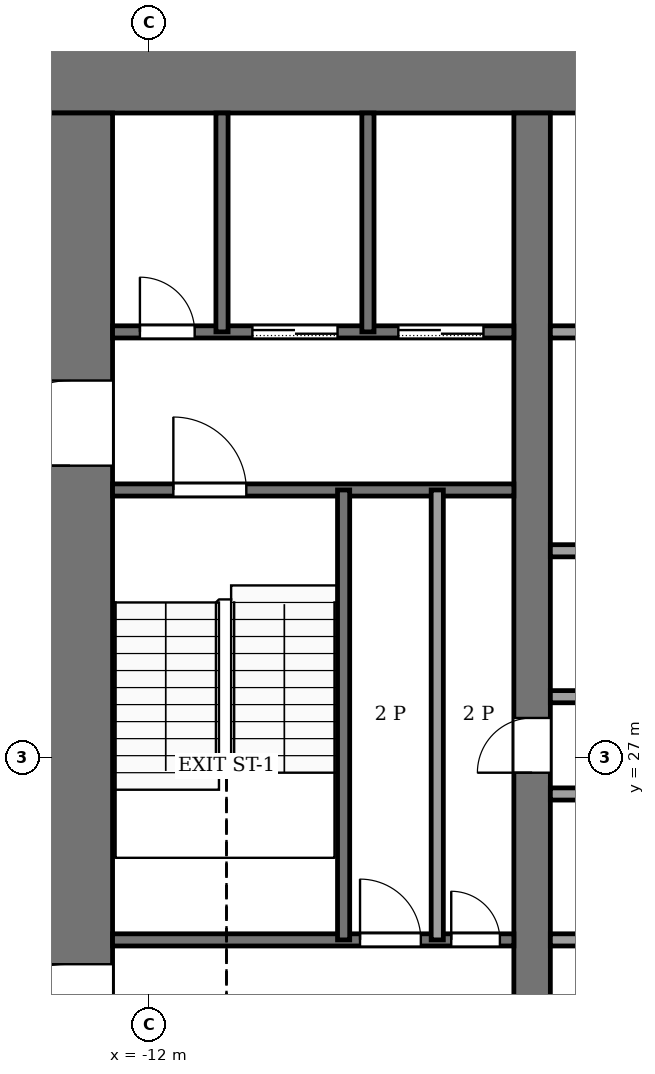
"""IFC4 building model, lengths in metres.
Left out: names, types, materials, properties, quantities, classifications, styles, units other than length and angle.
Written with IfcOpenShell. Run it as: python <this file> out.ifc"""

import sys

from ifc_helpers import new_model, si_unit, direction, frame, frame_2d, origin, place, context, subcontext, project, spatial, rectangle, extrude, element, fill, save


model = new_model("IFC4")
c1 = context("Model", 3, precision=1e-05, world=origin(), true_north=direction((0.0, 1.0)))
c2 = subcontext(c1, "Body", "Model", "MODEL_VIEW")
j1 = project(units=[si_unit("LENGTHUNIT", "METRE"), si_unit("PLANEANGLEUNIT", "RADIAN")], contexts=[c1])
p1 = place(None, origin())
s1 = spatial("IfcSite", under=j1, at=p1, CompositionType="ELEMENT")
p2 = place(p1, origin())
s2 = spatial("IfcBuilding", under=s1, at=p2, CompositionType="ELEMENT")
p3 = place(p2, frame((0.0, 0.0, 34.0)))
s3 = spatial("IfcBuildingStorey", under=s2, at=p3, CompositionType="ELEMENT", Elevation=34.0)
p4 = place(p3, frame((-14.0, 38.3, -0.13), z_axis=(0.0, 0.0, 1.0), x_axis=(1.0, 0.0, 0.0)))
e1 = element("IfcWall", 1, at=p4, inside=s3, PredefinedType="SHEAR", context=c2, shape_type="SweptSolid", body=[
    extrude(rectangle(XDim=28.0, YDim=1.4, at=frame_2d((14.0, 0.0))), origin(), (0.0, 0.0, 1.0), 4.0),
])
p5 = place(p3, frame((-13.3, 18.4, -0.13), z_axis=(0.0, 0.0, 1.0), x_axis=(0.0, 1.0, 0.0)))
e2 = element("IfcWall", 2, at=p5, inside=s3, PredefinedType="SHEAR", context=c2, shape_type="SweptSolid", body=[
    extrude(rectangle(XDim=19.2, YDim=1.4, at=frame_2d((9.6, 0.0))), origin(), (0.0, 0.0, 1.0), 4.0),
])
p6 = place(p5, frame((2.8, 0.0, 0.13)))
e3 = element("IfcOpeningElement", 3, at=p6, cuts=e2, PredefinedType="OPENING", context=c2, shape_type="SweptSolid", body=[
    extrude(rectangle(XDim=2.4, YDim=2.4, at=frame_2d((1.2, 1.2))), frame((0.0, 0.71, 0.0), z_axis=(0.0, -1.0, 0.0), x_axis=(1.0, 0.0, 0.0)), (0.0, 0.0, 1.0), 1.42),
])
p7 = place(p5, frame((13.4, 0.0, 0.13)))
e4 = element("IfcOpeningElement", 4, at=p7, cuts=e2, PredefinedType="OPENING", context=c2, shape_type="SweptSolid", body=[
    extrude(rectangle(XDim=1.4, YDim=2.2, at=frame_2d((0.7, 1.1))), frame((0.0, 0.71, 0.0), z_axis=(0.0, -1.0, 0.0), x_axis=(1.0, 0.0, 0.0)), (0.0, 0.0, 1.0), 1.42),
])
p8 = place(p3, frame((-5.7, 18.4, -0.13), z_axis=(0.0, 0.0, 1.0), x_axis=(0.0, 1.0, 0.0)))
e5 = element("IfcWall", 5, at=p8, inside=s3, PredefinedType="SHEAR", context=c2, shape_type="SweptSolid", body=[
    extrude(rectangle(XDim=19.2, YDim=0.6, at=frame_2d((9.6, 0.0))), origin(), (0.0, 0.0, 1.0), 4.0),
])
p9 = place(p8, frame((8.35, 0.0, 0.13)))
e6 = element("IfcOpeningElement", 6, at=p9, cuts=e5, PredefinedType="OPENING", context=c2, shape_type="SweptSolid", body=[
    extrude(rectangle(XDim=0.9, YDim=2.1, at=frame_2d((0.45, 1.05))), frame((0.0, 0.31, 0.0), z_axis=(0.0, -1.0, 0.0), x_axis=(1.0, 0.0, 0.0)), (0.0, 0.0, 1.0), 0.62),
])
p10 = place(p3, frame((-12.6, 24.0, 0.0), z_axis=(0.0, 0.0, 1.0), x_axis=(1.0, 0.0, 0.0)))
e7 = element("IfcWall", 7, at=p10, inside=s3, PredefinedType="PARTITIONING", context=c2, shape_type="SweptSolid", body=[
    extrude(rectangle(XDim=6.6, YDim=0.2, at=frame_2d((3.3, 0.0))), origin(), (0.0, 0.0, 1.0), 3.87),
])
p11 = place(p10, frame((4.07, 0.0, 0.0)))
e8 = element("IfcOpeningElement", 8, at=p11, cuts=e7, PredefinedType="OPENING", context=c2, shape_type="SweptSolid", body=[
    extrude(rectangle(XDim=1.0, YDim=2.1, at=frame_2d((0.5, 1.05))), frame((0.0, 0.11, 0.0), z_axis=(0.0, -1.0, 0.0), x_axis=(1.0, 0.0, 0.0)), (0.0, 0.0, 1.0), 0.22),
])
p12 = place(p10, frame((5.57, 0.0, 0.0)))
e9 = element("IfcOpeningElement", 9, at=p12, cuts=e7, PredefinedType="OPENING", context=c2, shape_type="SweptSolid", body=[
    extrude(rectangle(XDim=0.8, YDim=2.1, at=frame_2d((0.4, 1.05))), frame((0.0, 0.11, 0.0), z_axis=(0.0, -1.0, 0.0), x_axis=(1.0, 0.0, 0.0)), (0.0, 0.0, 1.0), 0.22),
])
p13 = place(p3, frame((-5.4, 24.0, 0.0), z_axis=(0.0, 0.0, 1.0), x_axis=(1.0, 0.0, 0.0)))
e10 = element("IfcWall", 10, at=p13, inside=s3, PredefinedType="PARTITIONING", context=c2, shape_type="SweptSolid", body=[
    extrude(rectangle(XDim=10.8, YDim=0.2, at=frame_2d((5.4, 0.0))), origin(), (0.0, 0.0, 1.0), 3.87),
])
p14 = place(p13, frame((0.75, 0.0, 0.0)))
e11 = element("IfcOpeningElement", 11, at=p14, cuts=e10, PredefinedType="OPENING", context=c2, shape_type="SweptSolid", body=[
    extrude(rectangle(XDim=1.2, YDim=2.2, at=frame_2d((0.6, 1.1))), frame((0.0, 0.11, 0.0), z_axis=(0.0, -1.0, 0.0), x_axis=(1.0, 0.0, 0.0)), (0.0, 0.0, 1.0), 0.22),
])
p15 = place(p13, frame((3.45, 0.0, 0.0)))
e12 = element("IfcOpeningElement", 12, at=p15, cuts=e10, PredefinedType="OPENING", context=c2, shape_type="SweptSolid", body=[
    extrude(rectangle(XDim=1.2, YDim=2.2, at=frame_2d((0.6, 1.1))), frame((0.0, 0.11, 0.0), z_axis=(0.0, -1.0, 0.0), x_axis=(1.0, 0.0, 0.0)), (0.0, 0.0, 1.0), 0.22),
])
p16 = place(p13, frame((6.15, 0.0, 0.0)))
e13 = element("IfcOpeningElement", 13, at=p16, cuts=e10, PredefinedType="OPENING", context=c2, shape_type="SweptSolid", body=[
    extrude(rectangle(XDim=1.2, YDim=2.2, at=frame_2d((0.6, 1.1))), frame((0.0, 0.11, 0.0), z_axis=(0.0, -1.0, 0.0), x_axis=(1.0, 0.0, 0.0)), (0.0, 0.0, 1.0), 0.22),
])
p17 = place(p13, frame((8.85, 0.0, 0.0)))
e14 = element("IfcOpeningElement", 14, at=p17, cuts=e10, PredefinedType="OPENING", context=c2, shape_type="SweptSolid", body=[
    extrude(rectangle(XDim=1.2, YDim=2.2, at=frame_2d((0.6, 1.1))), frame((0.0, 0.11, 0.0), z_axis=(0.0, -1.0, 0.0), x_axis=(1.0, 0.0, 0.0)), (0.0, 0.0, 1.0), 0.22),
])
for number, where, z_axis, x_axis in (
    (15, (-5.4, 26.4, 0.0), (0.0, 0.0, 1.0), (1.0, 0.0, 0.0)),
    (16, (-5.4, 28.0, 0.0), (0.0, 0.0, 1.0), (1.0, 0.0, 0.0)),
    (17, (-5.4, 30.4, 0.0), (0.0, 0.0, 1.0), (1.0, 0.0, 0.0)),
):
    element("IfcWall", number, at=place(p3, frame(where, z_axis=z_axis, x_axis=x_axis)), inside=s3, PredefinedType="PARTITIONING", context=c2, shape_type="SweptSolid", body=[
        extrude(rectangle(XDim=10.8, YDim=0.2, at=frame_2d((5.4, 0.0))), origin(), (0.0, 0.0, 1.0), 3.87),
    ])
p18 = place(p3, frame((-12.6, 31.4, 0.0), z_axis=(0.0, 0.0, 1.0), x_axis=(1.0, 0.0, 0.0)))
e18 = element("IfcWall", 18, at=p18, inside=s3, PredefinedType="PARTITIONING", context=c2, shape_type="SweptSolid", body=[
    extrude(rectangle(XDim=6.6, YDim=0.2, at=frame_2d((3.3, 0.0))), origin(), (0.0, 0.0, 1.0), 3.87),
])
p19 = place(p18, frame((1.0, 0.0, 0.0)))
e19 = element("IfcOpeningElement", 19, at=p19, cuts=e18, PredefinedType="OPENING", context=c2, shape_type="SweptSolid", body=[
    extrude(rectangle(XDim=1.2, YDim=2.2, at=frame_2d((0.6, 1.1))), frame((0.0, 0.11, 0.0), z_axis=(0.0, -1.0, 0.0), x_axis=(1.0, 0.0, 0.0)), (0.0, 0.0, 1.0), 0.22),
])
p20 = place(p3, frame((-12.6, 34.0, 0.0), z_axis=(0.0, 0.0, 1.0), x_axis=(1.0, 0.0, 0.0)))
e20 = element("IfcWall", 20, at=p20, inside=s3, PredefinedType="PARTITIONING", context=c2, shape_type="SweptSolid", body=[
    extrude(rectangle(XDim=6.6, YDim=0.2, at=frame_2d((3.3, 0.0))), origin(), (0.0, 0.0, 1.0), 3.87),
])
p21 = place(p20, frame((4.7, 0.0, 0.0)))
e21 = element("IfcOpeningElement", 21, at=p21, cuts=e20, PredefinedType="OPENING", context=c2, shape_type="SweptSolid", body=[
    extrude(rectangle(XDim=1.4, YDim=2.2, at=frame_2d((0.7, 1.1))), frame((0.0, 0.11, 0.0), z_axis=(0.0, -1.0, 0.0), x_axis=(1.0, 0.0, 0.0)), (0.0, 0.0, 1.0), 0.22),
])
p22 = place(p20, frame((2.3, 0.0, 0.0)))
e22 = element("IfcOpeningElement", 22, at=p22, cuts=e20, PredefinedType="OPENING", context=c2, shape_type="SweptSolid", body=[
    extrude(rectangle(XDim=1.4, YDim=2.2, at=frame_2d((0.7, 1.1))), frame((0.0, 0.11, 0.0), z_axis=(0.0, -1.0, 0.0), x_axis=(1.0, 0.0, 0.0)), (0.0, 0.0, 1.0), 0.22),
])
p23 = place(p20, frame((0.45, 0.0, 0.0)))
e23 = element("IfcOpeningElement", 23, at=p23, cuts=e20, PredefinedType="OPENING", context=c2, shape_type="SweptSolid", body=[
    extrude(rectangle(XDim=0.9, YDim=2.1, at=frame_2d((0.45, 1.05))), frame((0.0, 0.11, 0.0), z_axis=(0.0, -1.0, 0.0), x_axis=(1.0, 0.0, 0.0)), (0.0, 0.0, 1.0), 0.22),
])
p24 = place(p3, frame((-5.4, 34.0, 0.0), z_axis=(0.0, 0.0, 1.0), x_axis=(1.0, 0.0, 0.0)))
e24 = element("IfcWall", 24, at=p24, inside=s3, PredefinedType="PARTITIONING", context=c2, shape_type="SweptSolid", body=[
    extrude(rectangle(XDim=10.8, YDim=0.2, at=frame_2d((5.4, 0.0))), origin(), (0.0, 0.0, 1.0), 3.87),
])
p25 = place(p24, frame((6.15, 0.0, 0.0)))
e25 = element("IfcOpeningElement", 25, at=p25, cuts=e24, PredefinedType="OPENING", context=c2, shape_type="SweptSolid", body=[
    extrude(rectangle(XDim=1.2, YDim=2.2, at=frame_2d((0.6, 1.1))), frame((0.0, 0.11, 0.0), z_axis=(0.0, -1.0, 0.0), x_axis=(1.0, 0.0, 0.0)), (0.0, 0.0, 1.0), 0.22),
])
p26 = place(p24, frame((8.95, 0.0, 0.0)))
e26 = element("IfcOpeningElement", 26, at=p26, cuts=e24, PredefinedType="OPENING", context=c2, shape_type="SweptSolid", body=[
    extrude(rectangle(XDim=1.0, YDim=2.1, at=frame_2d((0.5, 1.05))), frame((0.0, 0.11, 0.0), z_axis=(0.0, -1.0, 0.0), x_axis=(1.0, 0.0, 0.0)), (0.0, 0.0, 1.0), 0.22),
])
p27 = place(p3, frame((-10.8, 34.0, 0.0), z_axis=(0.0, 0.0, 1.0), x_axis=(0.0, 1.0, 0.0)))
e27 = element("IfcWall", 27, at=p27, inside=s3, PredefinedType="PARTITIONING", context=c2, shape_type="SweptSolid", body=[
    extrude(rectangle(XDim=3.6, YDim=0.2, at=frame_2d((1.8, 0.0))), origin(), (0.0, 0.0, 1.0), 3.87),
])
p28 = place(p3, frame((-8.8, 24.0, 0.0), z_axis=(0.0, 0.0, 1.0), x_axis=(0.0, 1.0, 0.0)))
e28 = element("IfcWall", 28, at=p28, inside=s3, PredefinedType="PARTITIONING", context=c2, shape_type="SweptSolid", body=[
    extrude(rectangle(XDim=7.4, YDim=0.2, at=frame_2d((3.7, 0.0))), origin(), (0.0, 0.0, 1.0), 3.87),
])
p29 = place(p3, frame((-8.4, 34.0, 0.0), z_axis=(0.0, 0.0, 1.0), x_axis=(0.0, 1.0, 0.0)))
e29 = element("IfcWall", 29, at=p29, inside=s3, PredefinedType="PARTITIONING", context=c2, shape_type="SweptSolid", body=[
    extrude(rectangle(XDim=3.6, YDim=0.2, at=frame_2d((1.8, 0.0))), origin(), (0.0, 0.0, 1.0), 3.87),
])
p30 = place(p3, frame((-7.26, 24.0, 0.0), z_axis=(0.0, 0.0, 1.0), x_axis=(0.0, 1.0, 0.0)))
e30 = element("IfcWall", 30, at=p30, inside=s3, PredefinedType="PARTITIONING", context=c2, shape_type="SweptSolid", body=[
    extrude(rectangle(XDim=7.4, YDim=0.2, at=frame_2d((3.7, 0.0))), origin(), (0.0, 0.0, 1.0), 3.87),
])
p31 = place(p21, origin())
e31 = element("IfcDoor", 31, at=p31, inside=s3, OperationType="SLIDING_TO_LEFT", PredefinedType="DOOR", context=c2, shape_type="SweptSolid", body=[
    extrude(rectangle(XDim=1.4, YDim=2.2, at=frame_2d((0.7, 1.1))), frame((0.0, 0.025, 0.0), z_axis=(0.0, -1.0, 0.0), x_axis=(1.0, 0.0, 0.0)), (0.0, 0.0, 1.0), 0.05),
])
fill(e21, e31)
p32 = place(p22, origin())
e32 = element("IfcDoor", 32, at=p32, inside=s3, OperationType="SLIDING_TO_LEFT", PredefinedType="DOOR", context=c2, shape_type="SweptSolid", body=[
    extrude(rectangle(XDim=1.4, YDim=2.2, at=frame_2d((0.7, 1.1))), frame((0.0, 0.025, 0.0), z_axis=(0.0, -1.0, 0.0), x_axis=(1.0, 0.0, 0.0)), (0.0, 0.0, 1.0), 0.05),
])
fill(e22, e32)
p33 = place(p23, origin())
e33 = element("IfcDoor", 33, at=p33, inside=s3, OperationType="SINGLE_SWING_RIGHT", PredefinedType="DOOR", context=c2, shape_type="SweptSolid", body=[
    extrude(rectangle(XDim=0.9, YDim=2.1, at=frame_2d((0.45, 1.05))), frame((0.0, 0.025, 0.0), z_axis=(0.0, -1.0, 0.0), x_axis=(1.0, 0.0, 0.0)), (0.0, 0.0, 1.0), 0.05),
])
fill(e23, e33)
p34 = place(p11, origin())
e34 = element("IfcDoor", 34, at=p34, inside=s3, OperationType="SINGLE_SWING_RIGHT", PredefinedType="DOOR", context=c2, shape_type="SweptSolid", body=[
    extrude(rectangle(XDim=1.0, YDim=2.1, at=frame_2d((0.5, 1.05))), frame((0.0, 0.025, 0.0), z_axis=(0.0, -1.0, 0.0), x_axis=(1.0, 0.0, 0.0)), (0.0, 0.0, 1.0), 0.05),
])
fill(e8, e34)
p35 = place(p12, origin())
e35 = element("IfcDoor", 35, at=p35, inside=s3, OperationType="SINGLE_SWING_LEFT", PredefinedType="DOOR", context=c2, shape_type="SweptSolid", body=[
    extrude(rectangle(XDim=0.8, YDim=2.1, at=frame_2d((0.4, 1.05))), frame((0.0, 0.025, 0.0), z_axis=(0.0, -1.0, 0.0), x_axis=(1.0, 0.0, 0.0)), (0.0, 0.0, 1.0), 0.05),
])
fill(e9, e35)
p36 = place(p9, origin())
e36 = element("IfcDoor", 36, at=p36, inside=s3, OperationType="SINGLE_SWING_LEFT", PredefinedType="DOOR", context=c2, shape_type="SweptSolid", body=[
    extrude(rectangle(XDim=0.9, YDim=2.1, at=frame_2d((0.45, 1.05))), frame((0.0, 0.025, 0.0), z_axis=(0.0, -1.0, 0.0), x_axis=(1.0, 0.0, 0.0)), (0.0, 0.0, 1.0), 0.05),
])
fill(e6, e36)
p37 = place(p19, origin())
e37 = element("IfcDoor", 37, at=p37, inside=s3, OperationType="SINGLE_SWING_RIGHT", PredefinedType="DOOR", context=c2, shape_type="SweptSolid", body=[
    extrude(rectangle(XDim=1.2, YDim=2.2, at=frame_2d((0.6, 1.1))), frame((0.0, 0.025, 0.0), z_axis=(0.0, -1.0, 0.0), x_axis=(1.0, 0.0, 0.0)), (0.0, 0.0, 1.0), 0.05),
])
fill(e19, e37)
p38 = place(p6, origin())
e38 = element("IfcDoor", 38, at=p38, inside=s3, OperationType="DOUBLE_DOOR_SINGLE_SWING", PredefinedType="DOOR", context=c2, shape_type="SweptSolid", body=[
    extrude(rectangle(XDim=2.4, YDim=2.4, at=frame_2d((1.2, 1.2))), frame((0.0, 0.025, 0.0), z_axis=(0.0, -1.0, 0.0), x_axis=(1.0, 0.0, 0.0)), (0.0, 0.0, 1.0), 0.05),
])
fill(e3, e38)
p39 = place(p7, origin())
e39 = element("IfcDoor", 39, at=p39, inside=s3, OperationType="SINGLE_SWING_RIGHT", PredefinedType="DOOR", context=c2, shape_type="SweptSolid", body=[
    extrude(rectangle(XDim=1.4, YDim=2.2, at=frame_2d((0.7, 1.1))), frame((0.0, 0.025, 0.0), z_axis=(0.0, -1.0, 0.0), x_axis=(1.0, 0.0, 0.0)), (0.0, 0.0, 1.0), 0.05),
])
fill(e4, e39)
save(model, sys.argv[1])
